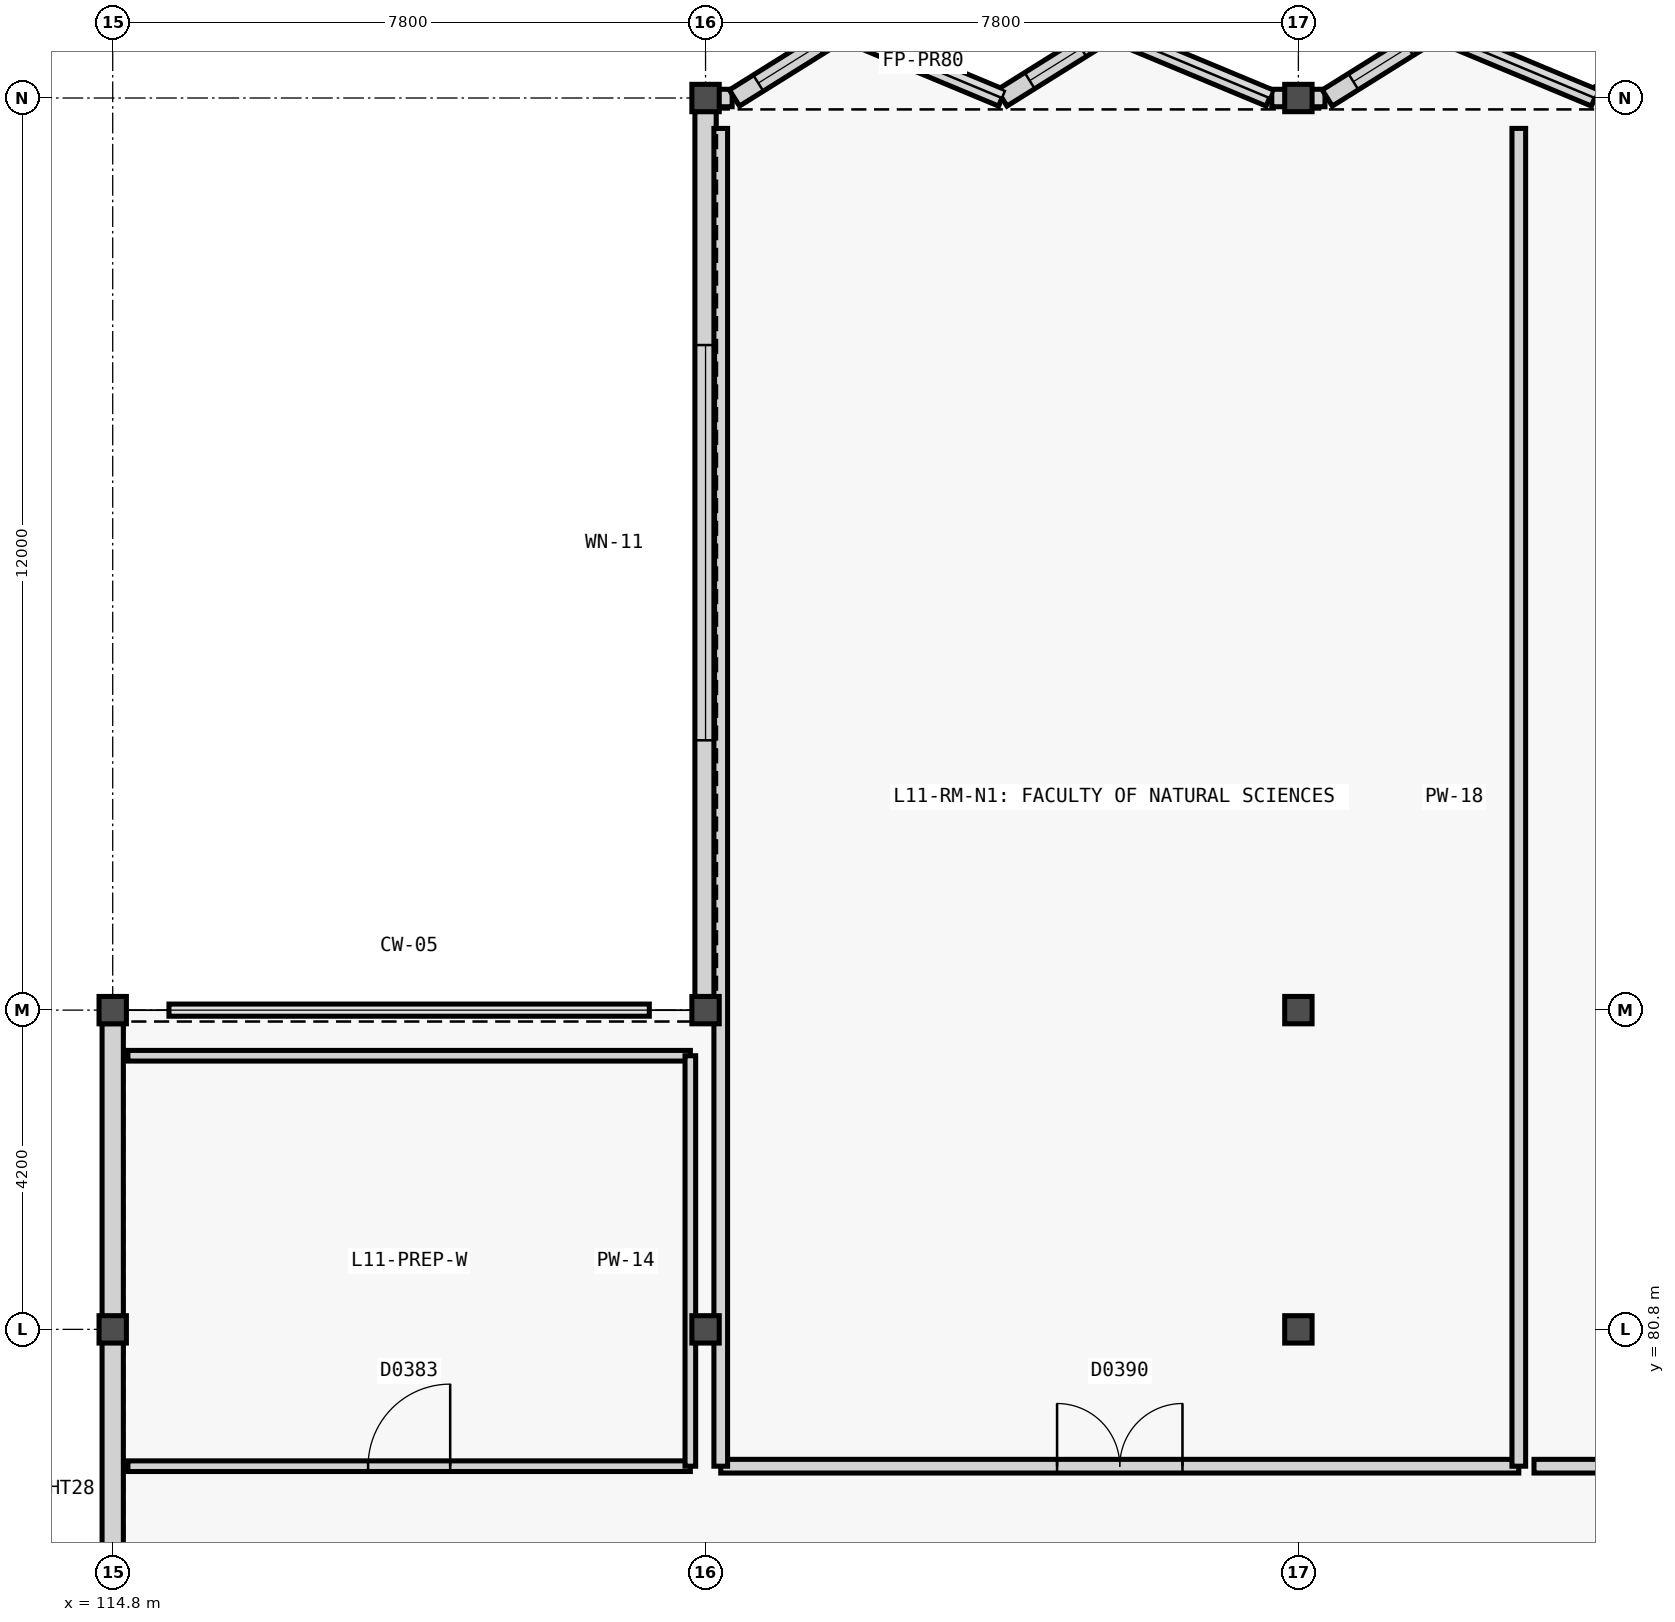
"""IFC4 building model, lengths in metres.
Left out: names, types, materials, properties, quantities, classifications, styles, units other than length and angle.
Written with IfcOpenShell. Run it as: python <this file> out.ifc"""

import sys

from ifc_helpers import new_model, si_unit, direction, frame, frame_2d, origin, origin_2d, place, context, subcontext, project, spatial, rectangle, extrude, element, fill, save


model = new_model("IFC4")
c1 = context("Model", 3, precision=1e-05, world=origin(), true_north=direction((0.0, 1.0)))
c2 = subcontext(c1, "Body", "Model", "MODEL_VIEW")
j1 = project(units=[si_unit("LENGTHUNIT", "METRE"), si_unit("PLANEANGLEUNIT", "RADIAN")], contexts=[c1])
p1 = place(None, origin())
s1 = spatial("IfcSite", under=j1, at=p1, CompositionType="ELEMENT")
p2 = place(p1, origin())
s2 = spatial("IfcBuilding", under=s1, at=p2, CompositionType="ELEMENT")
p3 = place(p2, frame((0.0, 0.0, 43.2)))
s3 = spatial("IfcBuildingStorey", under=s2, at=p3, CompositionType="ELEMENT", Elevation=43.2)
for number, where, z_axis, x_axis in (
    (1, (114.8, 80.8, 0.0), (0.0, 0.0, 1.0), (1.0, 0.0, 0.0)),
    (2, (114.8, 85.0, 0.0), (0.0, 0.0, 1.0), (1.0, 0.0, 0.0)),
    (3, (122.6, 80.8, 0.0), (0.0, 0.0, 1.0), (1.0, 0.0, 0.0)),
    (4, (122.6, 85.0, 0.0), (0.0, 0.0, 1.0), (1.0, 0.0, 0.0)),
    (5, (122.6, 97.0, 0.0), (0.0, 0.0, 1.0), (1.0, 0.0, 0.0)),
    (6, (130.4, 80.8, 0.0), (0.0, 0.0, 1.0), (1.0, 0.0, 0.0)),
    (7, (130.4, 85.0, 0.0), (0.0, 0.0, 1.0), (1.0, 0.0, 0.0)),
    (8, (130.4, 97.0, 0.0), (0.0, 0.0, 1.0), (1.0, 0.0, 0.0)),
):
    element("IfcColumn", number, at=place(p3, frame(where, z_axis=z_axis, x_axis=x_axis)), inside=s3, PredefinedType="COLUMN", context=c2, shape_type="SweptSolid", body=[
        extrude(rectangle(XDim=0.36, YDim=0.36, at=origin_2d()), origin(), (0.0, 0.0, 1.0), 3.66),
    ])
p4 = place(p3, frame((122.6, 85.178, 0.0), z_axis=(0.0, 0.0, 1.0), x_axis=(0.0, 1.0, 0.0)))
e9 = element("IfcWall", 9, at=p4, inside=s3, PredefinedType="SOLIDWALL", context=c2, shape_type="SweptSolid", body=[
    extrude(rectangle(XDim=11.644, YDim=0.28, at=frame_2d((5.822, 0.0))), origin(), (0.0, 0.0, 1.0), 3.16),
])
p5 = place(p4, frame((3.372, 0.0, 0.82)))
e10 = element("IfcOpeningElement", 10, at=p5, cuts=e9, PredefinedType="OPENING", context=c2, shape_type="SweptSolid", body=[
    extrude(rectangle(XDim=5.2, YDim=1.45, at=frame_2d((2.6, 0.725))), frame((0.0, 0.15, 0.0), z_axis=(0.0, -1.0, 0.0), x_axis=(1.0, 0.0, 0.0)), (0.0, 0.0, 1.0), 0.3),
])
p6 = place(p3, frame((114.8, 72.578, 0.0), z_axis=(0.0, 0.0, 1.0), x_axis=(0.0, 1.0, 0.0)))
e11 = element("IfcWall", 11, at=p6, inside=s3, PredefinedType="SOLIDWALL", context=c2, shape_type="SweptSolid", body=[
    extrude(rectangle(XDim=12.244, YDim=0.28, at=frame_2d((6.122, 0.0))), origin(), (0.0, 0.0, 1.0), 3.06),
])
for number, where, z_axis, x_axis in (
    (12, (122.6, 97.0, 0.0), (0.0, 0.0, 1.0), (1.0, 0.0, 0.0)),
    (13, (130.05, 97.0, 0.0), (0.0, 0.0, 1.0), (1.0, 0.0, 0.0)),
):
    element("IfcWall", number, at=place(p3, frame(where, z_axis=z_axis, x_axis=x_axis)), inside=s3, PredefinedType="SOLIDWALL", context=c2, shape_type="SweptSolid", body=[
        extrude(rectangle(XDim=0.35, YDim=0.23, at=frame_2d((0.175, 0.0))), origin(), (0.0, 0.0, 1.0), 3.66),
    ])
p7 = place(p3, frame((130.4, 97.0, 0.0), z_axis=(0.0, 0.0, 1.0), x_axis=(1.0, 0.0, 0.0)))
e14 = element("IfcWall", 14, at=p7, inside=s3, PredefinedType="SOLIDWALL", context=c2, shape_type="SweptSolid", body=[
    extrude(rectangle(XDim=0.35, YDim=0.23, at=frame_2d((0.175, 0.0))), origin(), (0.0, 0.0, 1.0), 3.66),
])
p8 = place(p3, frame((122.98, 97.0, 0.0), z_axis=(0.0, 0.0, 1.0), x_axis=(0.848023086369, 0.529959286158, 0.0)))
e15 = element("IfcWall", 15, at=p8, inside=s3, PredefinedType="SOLIDWALL", context=c2, shape_type="SweptSolid", body=[
    extrude(rectangle(XDim=1.66, YDim=0.25, at=frame_2d((0.83, 0.0))), origin(), (0.0, 0.0, 1.0), 3.66),
])
p9 = place(p8, frame((0.37, 0.0, 0.82)))
e16 = element("IfcOpeningElement", 16, at=p9, cuts=e15, PredefinedType="OPENING", context=c2, shape_type="SweptSolid", body=[
    extrude(rectangle(XDim=0.92, YDim=1.38, at=frame_2d((0.46, 0.69))), frame((0.0, 0.135, 0.0), z_axis=(0.0, -1.0, 0.0), x_axis=(1.0, 0.0, 0.0)), (0.0, 0.0, 1.0), 0.27),
])
p10 = place(p3, frame((124.388, 97.88, 0.0), z_axis=(0.0, 0.0, 1.0), x_axis=(0.92309902008, -0.384562347517, 0.0)))
e17 = element("IfcWall", 17, at=p10, inside=s3, PredefinedType="SOLIDWALL", context=c2, shape_type="SweptSolid", body=[
    extrude(rectangle(XDim=2.288, YDim=0.23, at=frame_2d((1.144, 0.0))), origin(), (0.0, 0.0, 1.0), 3.66),
])
p11 = place(p3, frame((126.5, 97.0, 0.0), z_axis=(0.0, 0.0, 1.0), x_axis=(0.848023086369, 0.529959286158, 0.0)))
e18 = element("IfcWall", 18, at=p11, inside=s3, PredefinedType="SOLIDWALL", context=c2, shape_type="SweptSolid", body=[
    extrude(rectangle(XDim=1.66, YDim=0.25, at=frame_2d((0.83, 0.0))), origin(), (0.0, 0.0, 1.0), 3.66),
])
p12 = place(p11, frame((0.43, 0.0, 0.82)))
e19 = element("IfcOpeningElement", 19, at=p12, cuts=e18, PredefinedType="OPENING", context=c2, shape_type="SweptSolid", body=[
    extrude(rectangle(XDim=0.8, YDim=1.35, at=frame_2d((0.4, 0.675))), frame((0.0, 0.135, 0.0), z_axis=(0.0, -1.0, 0.0), x_axis=(1.0, 0.0, 0.0)), (0.0, 0.0, 1.0), 0.27),
])
p13 = place(p3, frame((127.908, 97.88, 0.0), z_axis=(0.0, 0.0, 1.0), x_axis=(0.92309902008, -0.384562347517, 0.0)))
e20 = element("IfcWall", 20, at=p13, inside=s3, PredefinedType="SOLIDWALL", context=c2, shape_type="SweptSolid", body=[
    extrude(rectangle(XDim=2.288, YDim=0.23, at=frame_2d((1.144, 0.0))), origin(), (0.0, 0.0, 1.0), 3.66),
])
p14 = place(p3, frame((130.78, 97.0, 0.0), z_axis=(0.0, 0.0, 1.0), x_axis=(0.848023086369, 0.529959286158, 0.0)))
e21 = element("IfcWall", 21, at=p14, inside=s3, PredefinedType="SOLIDWALL", context=c2, shape_type="SweptSolid", body=[
    extrude(rectangle(XDim=1.66, YDim=0.25, at=frame_2d((0.83, 0.0))), origin(), (0.0, 0.0, 1.0), 3.66),
])
p15 = place(p14, frame((0.405, 0.0, 0.82)))
e22 = element("IfcOpeningElement", 22, at=p15, cuts=e21, PredefinedType="OPENING", context=c2, shape_type="SweptSolid", body=[
    extrude(rectangle(XDim=0.85, YDim=1.4, at=frame_2d((0.425, 0.7))), frame((0.0, 0.135, 0.0), z_axis=(0.0, -1.0, 0.0), x_axis=(1.0, 0.0, 0.0)), (0.0, 0.0, 1.0), 0.27),
])
p16 = place(p3, frame((132.188, 97.88, 0.0), z_axis=(0.0, 0.0, 1.0), x_axis=(0.92309902008, -0.384562347517, 0.0)))
e23 = element("IfcWall", 23, at=p16, inside=s3, PredefinedType="SOLIDWALL", context=c2, shape_type="SweptSolid", body=[
    extrude(rectangle(XDim=2.288, YDim=0.23, at=frame_2d((1.144, 0.0))), origin(), (0.0, 0.0, 1.0), 3.66),
])
p17 = place(p3, frame((134.3, 97.0, 0.0), z_axis=(0.0, 0.0, 1.0), x_axis=(0.848023086369, 0.529959286158, 0.0)))
e24 = element("IfcWall", 24, at=p17, inside=s3, PredefinedType="SOLIDWALL", context=c2, shape_type="SweptSolid", body=[
    extrude(rectangle(XDim=1.66, YDim=0.25, at=frame_2d((0.83, 0.0))), origin(), (0.0, 0.0, 1.0), 3.66),
])
p18 = place(p17, frame((0.38, 0.0, 0.82)))
e25 = element("IfcOpeningElement", 25, at=p18, cuts=e24, PredefinedType="OPENING", context=c2, shape_type="SweptSolid", body=[
    extrude(rectangle(XDim=0.9, YDim=1.45, at=frame_2d((0.45, 0.725))), frame((0.0, 0.135, 0.0), z_axis=(0.0, -1.0, 0.0), x_axis=(1.0, 0.0, 0.0)), (0.0, 0.0, 1.0), 0.27),
])
p19 = place(p3, frame((115.0, 79.0, 0.0), z_axis=(0.0, 0.0, 1.0), x_axis=(1.0, 0.0, 0.0)))
e26 = element("IfcWall", 26, at=p19, inside=s3, PredefinedType="PARTITIONING", context=c2, shape_type="SweptSolid", body=[
    extrude(rectangle(XDim=7.4, YDim=0.14, at=frame_2d((3.7, 0.0))), origin(), (0.0, 0.0, 1.0), 3.64),
])
p20 = place(p19, frame((3.16, 0.0, 0.0)))
e27 = element("IfcOpeningElement", 27, at=p20, cuts=e26, PredefinedType="OPENING", context=c2, shape_type="SweptSolid", body=[
    extrude(rectangle(XDim=1.08, YDim=2.2, at=frame_2d((0.54, 1.1))), frame((0.0, 0.08, 0.0), z_axis=(0.0, -1.0, 0.0), x_axis=(1.0, 0.0, 0.0)), (0.0, 0.0, 1.0), 0.16),
])
p21 = place(p3, frame((115.0, 84.4, 0.0), z_axis=(0.0, 0.0, 1.0), x_axis=(1.0, 0.0, 0.0)))
e28 = element("IfcWall", 28, at=p21, inside=s3, PredefinedType="PARTITIONING", context=c2, shape_type="SweptSolid", body=[
    extrude(rectangle(XDim=7.4, YDim=0.14, at=frame_2d((3.7, 0.0))), origin(), (0.0, 0.0, 1.0), 3.64),
])
p22 = place(p3, frame((122.4, 79.0, 0.0), z_axis=(0.0, 0.0, 1.0), x_axis=(0.0, 1.0, 0.0)))
e29 = element("IfcWall", 29, at=p22, inside=s3, PredefinedType="PARTITIONING", context=c2, shape_type="SweptSolid", body=[
    extrude(rectangle(XDim=5.4, YDim=0.14, at=frame_2d((2.7, 0.0))), origin(), (0.0, 0.0, 1.0), 3.14),
])
p23 = place(p3, frame((122.8, 79.0, 0.0), z_axis=(0.0, 0.0, 1.0), x_axis=(1.0, 0.0, 0.0)))
e30 = element("IfcWall", 30, at=p23, inside=s3, PredefinedType="PARTITIONING", context=c2, shape_type="SweptSolid", body=[
    extrude(rectangle(XDim=10.5, YDim=0.18, at=frame_2d((5.25, 0.0))), origin(), (0.0, 0.0, 1.0), 3.64),
])
p24 = place(p23, frame((4.425, 0.0, 0.0)))
e31 = element("IfcOpeningElement", 31, at=p24, cuts=e30, PredefinedType="OPENING", context=c2, shape_type="SweptSolid", body=[
    extrude(rectangle(XDim=1.65, YDim=2.3, at=frame_2d((0.825, 1.15))), frame((0.0, 0.1, 0.0), z_axis=(0.0, -1.0, 0.0), x_axis=(1.0, 0.0, 0.0)), (0.0, 0.0, 1.0), 0.2),
])
p25 = place(p3, frame((122.8, 79.0, 0.0), z_axis=(0.0, 0.0, 1.0), x_axis=(0.0, 1.0, 0.0)))
e32 = element("IfcWall", 32, at=p25, inside=s3, PredefinedType="PARTITIONING", context=c2, shape_type="SweptSolid", body=[
    extrude(rectangle(XDim=17.6, YDim=0.18, at=frame_2d((8.8, 0.0))), origin(), (0.0, 0.0, 1.0), 3.14),
])
p26 = place(p3, frame((133.3, 79.0, 0.0), z_axis=(0.0, 0.0, 1.0), x_axis=(0.0, 1.0, 0.0)))
e33 = element("IfcWall", 33, at=p26, inside=s3, PredefinedType="PARTITIONING", context=c2, shape_type="SweptSolid", body=[
    extrude(rectangle(XDim=17.6, YDim=0.18, at=frame_2d((8.8, 0.0))), origin(), (0.0, 0.0, 1.0), 3.64),
])
p27 = place(p3, frame((133.5, 79.0, 0.0), z_axis=(0.0, 0.0, 1.0), x_axis=(1.0, 0.0, 0.0)))
e34 = element("IfcWall", 34, at=p27, inside=s3, PredefinedType="PARTITIONING", context=c2, shape_type="SweptSolid", body=[
    extrude(rectangle(XDim=10.8, YDim=0.18, at=frame_2d((5.4, 0.0))), origin(), (0.0, 0.0, 1.0), 3.64),
])
p28 = place(p27, frame((4.55, 0.0, 0.0)))
e35 = element("IfcOpeningElement", 35, at=p28, cuts=e34, PredefinedType="OPENING", context=c2, shape_type="SweptSolid", body=[
    extrude(rectangle(XDim=1.7, YDim=2.25, at=frame_2d((0.85, 1.125))), frame((0.0, 0.1, 0.0), z_axis=(0.0, -1.0, 0.0), x_axis=(1.0, 0.0, 0.0)), (0.0, 0.0, 1.0), 0.2),
])
p29 = place(p5, origin())
e36 = element("IfcWindow", 36, at=p29, inside=s3, PartitioningType="SINGLE_PANEL", PredefinedType="WINDOW", context=c2, shape_type="SweptSolid", body=[
    extrude(rectangle(XDim=5.2, YDim=1.45, at=frame_2d((2.6, 0.725))), frame((0.0, 0.03, 0.0), z_axis=(0.0, -1.0, 0.0), x_axis=(1.0, 0.0, 0.0)), (0.0, 0.0, 1.0), 0.06),
])
fill(e10, e36)
p30 = place(p9, origin())
e37 = element("IfcWindow", 37, at=p30, inside=s3, PartitioningType="SINGLE_PANEL", PredefinedType="WINDOW", context=c2, shape_type="SweptSolid", body=[
    extrude(rectangle(XDim=0.92, YDim=1.38, at=frame_2d((0.46, 0.69))), frame((0.0, 0.03, 0.0), z_axis=(0.0, -1.0, 0.0), x_axis=(1.0, 0.0, 0.0)), (0.0, 0.0, 1.0), 0.06),
])
fill(e16, e37)
p31 = place(p12, origin())
e38 = element("IfcWindow", 38, at=p31, inside=s3, PartitioningType="SINGLE_PANEL", PredefinedType="WINDOW", context=c2, shape_type="SweptSolid", body=[
    extrude(rectangle(XDim=0.8, YDim=1.35, at=frame_2d((0.4, 0.675))), frame((0.0, 0.03, 0.0), z_axis=(0.0, -1.0, 0.0), x_axis=(1.0, 0.0, 0.0)), (0.0, 0.0, 1.0), 0.06),
])
fill(e19, e38)
p32 = place(p15, origin())
e39 = element("IfcWindow", 39, at=p32, inside=s3, PartitioningType="SINGLE_PANEL", PredefinedType="WINDOW", context=c2, shape_type="SweptSolid", body=[
    extrude(rectangle(XDim=0.85, YDim=1.4, at=frame_2d((0.425, 0.7))), frame((0.0, 0.03, 0.0), z_axis=(0.0, -1.0, 0.0), x_axis=(1.0, 0.0, 0.0)), (0.0, 0.0, 1.0), 0.06),
])
fill(e22, e39)
p33 = place(p20, origin())
e40 = element("IfcDoor", 40, at=p33, inside=s3, OperationType="SINGLE_SWING_RIGHT", PredefinedType="DOOR", context=c2, shape_type="SweptSolid", body=[
    extrude(rectangle(XDim=1.08, YDim=2.2, at=frame_2d((0.54, 1.1))), frame((0.0, 0.025, 0.0), z_axis=(0.0, -1.0, 0.0), x_axis=(1.0, 0.0, 0.0)), (0.0, 0.0, 1.0), 0.05),
])
fill(e27, e40)
p34 = place(p24, origin())
e41 = element("IfcDoor", 41, at=p34, inside=s3, OperationType="DOUBLE_DOOR_SINGLE_SWING", PredefinedType="DOOR", context=c2, shape_type="SweptSolid", body=[
    extrude(rectangle(XDim=1.65, YDim=2.3, at=frame_2d((0.825, 1.15))), frame((0.0, 0.025, 0.0), z_axis=(0.0, -1.0, 0.0), x_axis=(1.0, 0.0, 0.0)), (0.0, 0.0, 1.0), 0.05),
])
fill(e31, e41)
save(model, sys.argv[1])
